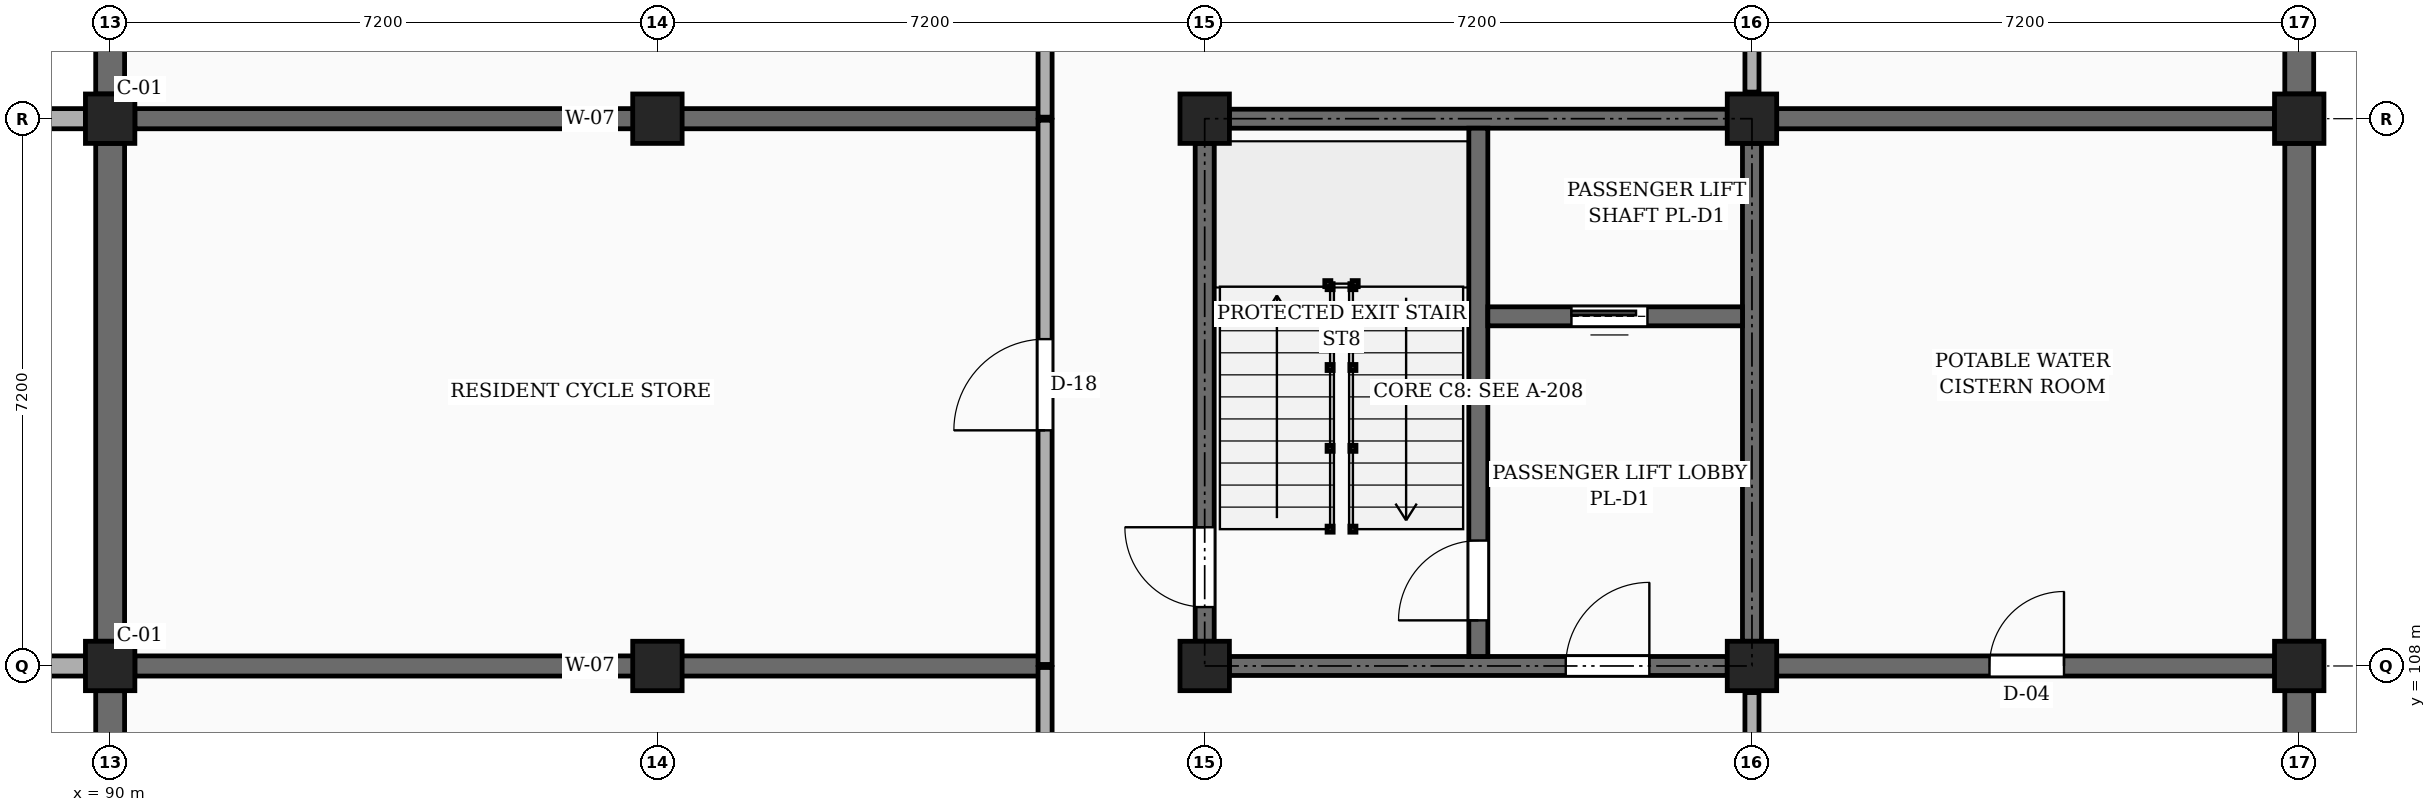
"""IFC4 building model, lengths in metres.
Left out: names, types, materials, properties, quantities, classifications, styles, units other than length and angle.
Written with IfcOpenShell. Run it as: python <this file> out.ifc"""

import sys

from ifc_helpers import new_model, si_unit, direction, frame, frame_2d, origin, origin_2d, place, context, subcontext, project, spatial, rectangle, extrude, element, fill, save


model = new_model("IFC4")
c1 = context("Model", 3, precision=1e-05, world=origin(), true_north=direction((0.0, 1.0)))
c2 = subcontext(c1, "Body", "Model", "MODEL_VIEW")
j1 = project(units=[si_unit("LENGTHUNIT", "METRE"), si_unit("PLANEANGLEUNIT", "RADIAN")], contexts=[c1])
p1 = place(None, origin())
s1 = spatial("IfcSite", under=j1, at=p1, CompositionType="ELEMENT")
p2 = place(p1, origin())
s2 = spatial("IfcBuilding", under=s1, at=p2, CompositionType="ELEMENT")
p3 = place(p2, frame((0.0, 0.0, -4.2)))
s3 = spatial("IfcBuildingStorey", under=s2, at=p3, CompositionType="ELEMENT", Elevation=-4.2)
for number, where, z_axis, x_axis in (
    (1, (87.81, 108.0, 0.0), (0.0, 0.0, 1.0), (1.0, 0.0, 0.0)),
    (2, (89.675, 115.2, 0.0), (0.0, 0.0, 1.0), (-1.0, 0.0, 0.0)),
):
    element("IfcWall", number, at=place(p3, frame(where, z_axis=z_axis, x_axis=x_axis)), inside=s3, PredefinedType="SOLIDWALL", context=c2, shape_type="SweptSolid", body=[
        extrude(rectangle(XDim=1.865, YDim=0.265, at=frame_2d((0.933, 0.0))), origin(), (0.0, 0.0, 1.0), 3.35),
    ])
for number, where, z_axis, x_axis in (
    (3, (90.0, 108.0, 0.0), (0.0, 0.0, 1.0), (1.0, 0.0, 0.0)),
    (4, (90.0, 115.2, 0.0), (0.0, 0.0, 1.0), (1.0, 0.0, 0.0)),
    (5, (97.2, 108.0, 0.0), (0.0, 0.0, 1.0), (1.0, 0.0, 0.0)),
    (6, (97.2, 115.2, 0.0), (0.0, 0.0, 1.0), (1.0, 0.0, 0.0)),
    (7, (104.4, 108.0, 0.0), (0.0, 0.0, 1.0), (1.0, 0.0, 0.0)),
    (8, (104.4, 115.2, 0.0), (0.0, 0.0, 1.0), (1.0, 0.0, 0.0)),
    (9, (111.6, 108.0, 0.0), (0.0, 0.0, 1.0), (1.0, 0.0, 0.0)),
    (10, (111.6, 115.2, 0.0), (0.0, 0.0, 1.0), (1.0, 0.0, 0.0)),
    (11, (118.8, 108.0, 0.0), (0.0, 0.0, 1.0), (1.0, 0.0, 0.0)),
    (12, (118.8, 115.2, 0.0), (0.0, 0.0, 1.0), (1.0, 0.0, 0.0)),
):
    element("IfcColumn", number, at=place(p3, frame(where, z_axis=z_axis, x_axis=x_axis)), inside=s3, PredefinedType="COLUMN", context=c2, shape_type="SweptSolid", body=[
        extrude(rectangle(XDim=0.65, YDim=0.65, at=origin_2d()), origin(), (0.0, 0.0, 1.0), 4.2),
    ])
for number, where, z_axis, x_axis in (
    (13, (118.8, 101.125, 0.0), (0.0, 0.0, 1.0), (0.0, 1.0, 0.0)),
    (14, (90.0, 107.675, 0.0), (0.0, 0.0, 1.0), (0.0, -1.0, 0.0)),
    (15, (118.8, 108.325, 0.0), (0.0, 0.0, 1.0), (0.0, 1.0, 0.0)),
    (16, (90.0, 114.875, 0.0), (0.0, 0.0, 1.0), (0.0, -1.0, 0.0)),
    (17, (118.8, 115.525, 0.0), (0.0, 0.0, 1.0), (0.0, 1.0, 0.0)),
    (18, (90.0, 122.075, 0.0), (0.0, 0.0, 1.0), (0.0, -1.0, 0.0)),
):
    element("IfcWall", number, at=place(p3, frame(where, z_axis=z_axis, x_axis=x_axis)), inside=s3, PredefinedType="USERDEFINED", context=c2, shape_type="SweptSolid", body=[
        extrude(rectangle(XDim=6.55, YDim=0.38, at=frame_2d((3.275, 0.0))), origin(), (0.0, 0.0, 1.0), 3.03),
    ])
p4 = place(p3, frame((90.325, 108.0, 0.0), z_axis=(0.0, 0.0, 1.0), x_axis=(1.0, 0.0, 0.0)))
e19 = element("IfcWall", 19, at=p4, inside=s3, PredefinedType="SOLIDWALL", context=c2, shape_type="SweptSolid", body=[
    extrude(rectangle(XDim=11.975, YDim=0.265, at=frame_2d((5.988, 0.0))), origin(), (0.0, 0.0, 1.0), 3.18),
])
p5 = place(p3, frame((111.925, 108.0, 0.0), z_axis=(0.0, 0.0, 1.0), x_axis=(1.0, 0.0, 0.0)))
e20 = element("IfcWall", 20, at=p5, inside=s3, PredefinedType="SOLIDWALL", context=c2, shape_type="SweptSolid", body=[
    extrude(rectangle(XDim=6.55, YDim=0.265, at=frame_2d((3.275, 0.0))), origin(), (0.0, 0.0, 1.0), 3.18),
])
p6 = place(p5, frame((2.8, 0.0, 0.0)))
e21 = element("IfcOpeningElement", 21, at=p6, cuts=e20, PredefinedType="OPENING", context=c2, shape_type="SweptSolid", body=[
    extrude(rectangle(XDim=0.98, YDim=2.12, at=frame_2d((0.49, 1.06))), frame((0.0, 0.143, 0.0), z_axis=(0.0, -1.0, 0.0), x_axis=(1.0, 0.0, 0.0)), (0.0, 0.0, 1.0), 0.285),
])
p7 = place(p3, frame((90.325, 115.2, 0.0), z_axis=(0.0, 0.0, 1.0), x_axis=(1.0, 0.0, 0.0)))
e22 = element("IfcWall", 22, at=p7, inside=s3, PredefinedType="SOLIDWALL", context=c2, shape_type="SweptSolid", body=[
    extrude(rectangle(XDim=11.975, YDim=0.265, at=frame_2d((5.988, 0.0))), origin(), (0.0, 0.0, 1.0), 3.18),
])
p8 = place(p3, frame((111.925, 115.2, 0.0), z_axis=(0.0, 0.0, 1.0), x_axis=(1.0, 0.0, 0.0)))
e23 = element("IfcWall", 23, at=p8, inside=s3, PredefinedType="SOLIDWALL", context=c2, shape_type="SweptSolid", body=[
    extrude(rectangle(XDim=6.55, YDim=0.265, at=frame_2d((3.275, 0.0))), origin(), (0.0, 0.0, 1.0), 3.18),
])
p9 = place(p3, frame((104.4, 108.325, 0.0), z_axis=(0.0, 0.0, 1.0), x_axis=(0.0, 1.0, 0.0)))
e24 = element("IfcWall", 24, at=p9, inside=s3, PredefinedType="SHEAR", context=c2, shape_type="SweptSolid", body=[
    extrude(rectangle(XDim=6.55, YDim=0.25, at=frame_2d((3.275, 0.0))), origin(), (0.0, 0.0, 1.0), 3.88),
])
p10 = place(p9, frame((0.45, 0.0, 0.0)))
e25 = element("IfcOpeningElement", 25, at=p10, cuts=e24, PredefinedType="OPENING", context=c2, shape_type="SweptSolid", body=[
    extrude(rectangle(XDim=1.05, YDim=2.15, at=frame_2d((0.525, 1.075))), frame((0.0, 0.135, 0.0), z_axis=(0.0, -1.0, 0.0), x_axis=(1.0, 0.0, 0.0)), (0.0, 0.0, 1.0), 0.27),
])
p11 = place(p3, frame((104.725, 115.2, 0.0), z_axis=(0.0, 0.0, 1.0), x_axis=(1.0, 0.0, 0.0)))
e26 = element("IfcWall", 26, at=p11, inside=s3, PredefinedType="SHEAR", context=c2, shape_type="SweptSolid", body=[
    extrude(rectangle(XDim=6.55, YDim=0.25, at=frame_2d((3.275, 0.0))), origin(), (0.0, 0.0, 1.0), 3.88),
])
p12 = place(p3, frame((111.6, 108.325, 0.0), z_axis=(0.0, 0.0, 1.0), x_axis=(0.0, 1.0, 0.0)))
e27 = element("IfcWall", 27, at=p12, inside=s3, PredefinedType="SHEAR", context=c2, shape_type="SweptSolid", body=[
    extrude(rectangle(XDim=6.55, YDim=0.25, at=frame_2d((3.275, 0.0))), origin(), (0.0, 0.0, 1.0), 3.88),
])
p13 = place(p3, frame((104.725, 108.0, 0.0), z_axis=(0.0, 0.0, 1.0), x_axis=(1.0, 0.0, 0.0)))
e28 = element("IfcWall", 28, at=p13, inside=s3, PredefinedType="SHEAR", context=c2, shape_type="SweptSolid", body=[
    extrude(rectangle(XDim=6.55, YDim=0.25, at=frame_2d((3.275, 0.0))), origin(), (0.0, 0.0, 1.0), 3.88),
])
p14 = place(p13, frame((4.425, 0.0, 0.0)))
e29 = element("IfcOpeningElement", 29, at=p14, cuts=e28, PredefinedType="OPENING", context=c2, shape_type="SweptSolid", body=[
    extrude(rectangle(XDim=1.1, YDim=2.15, at=frame_2d((0.55, 1.075))), frame((0.0, 0.135, 0.0), z_axis=(0.0, -1.0, 0.0), x_axis=(1.0, 0.0, 0.0)), (0.0, 0.0, 1.0), 0.27),
])
p15 = place(p3, frame((108.0, 108.125, 0.0), z_axis=(0.0, 0.0, 1.0), x_axis=(0.0, 1.0, 0.0)))
e30 = element("IfcWall", 30, at=p15, inside=s3, PredefinedType="SHEAR", context=c2, shape_type="SweptSolid", body=[
    extrude(rectangle(XDim=6.95, YDim=0.25, at=frame_2d((3.475, 0.0))), origin(), (0.0, 0.0, 1.0), 3.88),
])
p16 = place(p15, frame((0.475, 0.0, 0.0)))
e31 = element("IfcOpeningElement", 31, at=p16, cuts=e30, PredefinedType="OPENING", context=c2, shape_type="SweptSolid", body=[
    extrude(rectangle(XDim=1.05, YDim=2.15, at=frame_2d((0.525, 1.075))), frame((0.0, 0.135, 0.0), z_axis=(0.0, -1.0, 0.0), x_axis=(1.0, 0.0, 0.0)), (0.0, 0.0, 1.0), 0.27),
])
p17 = place(p3, frame((108.125, 112.6, 0.0), z_axis=(0.0, 0.0, 1.0), x_axis=(1.0, 0.0, 0.0)))
e32 = element("IfcWall", 32, at=p17, inside=s3, PredefinedType="SHEAR", context=c2, shape_type="SweptSolid", body=[
    extrude(rectangle(XDim=3.35, YDim=0.25, at=frame_2d((1.675, 0.0))), origin(), (0.0, 0.0, 1.0), 3.88),
])
p18 = place(p17, frame((1.1, 0.0, 0.0)))
e33 = element("IfcOpeningElement", 33, at=p18, cuts=e32, PredefinedType="OPENING", context=c2, shape_type="SweptSolid", body=[
    extrude(rectangle(XDim=1.0, YDim=2.2, at=frame_2d((0.5, 1.1))), frame((0.0, 0.135, 0.0), z_axis=(0.0, -1.0, 0.0), x_axis=(1.0, 0.0, 0.0)), (0.0, 0.0, 1.0), 0.27),
])
p19 = place(p3, frame((102.3, 100.82, 0.0), z_axis=(0.0, 0.0, 1.0), x_axis=(0.0, 1.0, 0.0)))
e34 = element("IfcWall", 34, at=p19, inside=s3, PredefinedType="PARTITIONING", context=c2, shape_type="SweptSolid", body=[
    extrude(rectangle(XDim=7.16, YDim=0.185, at=frame_2d((3.58, 0.0))), origin(), (0.0, 0.0, 1.0), 3.315),
])
p20 = place(p19, frame((3.08, 0.0, 0.0)))
e35 = element("IfcOpeningElement", 35, at=p20, cuts=e34, PredefinedType="OPENING", context=c2, shape_type="SweptSolid", body=[
    extrude(rectangle(XDim=1.2, YDim=2.2, at=frame_2d((0.6, 1.1))), frame((0.0, 0.103, 0.0), z_axis=(0.0, -1.0, 0.0), x_axis=(1.0, 0.0, 0.0)), (0.0, 0.0, 1.0), 0.205),
])
p21 = place(p3, frame((102.3, 108.02, 0.0), z_axis=(0.0, 0.0, 1.0), x_axis=(0.0, 1.0, 0.0)))
e36 = element("IfcWall", 36, at=p21, inside=s3, PredefinedType="PARTITIONING", context=c2, shape_type="SweptSolid", body=[
    extrude(rectangle(XDim=7.16, YDim=0.185, at=frame_2d((3.58, 0.0))), origin(), (0.0, 0.0, 1.0), 3.315),
])
p22 = place(p21, frame((3.08, 0.0, 0.0)))
e37 = element("IfcOpeningElement", 37, at=p22, cuts=e36, PredefinedType="OPENING", context=c2, shape_type="SweptSolid", body=[
    extrude(rectangle(XDim=1.2, YDim=2.2, at=frame_2d((0.6, 1.1))), frame((0.0, 0.103, 0.0), z_axis=(0.0, -1.0, 0.0), x_axis=(1.0, 0.0, 0.0)), (0.0, 0.0, 1.0), 0.205),
])
p23 = place(p3, frame((102.3, 115.22, 0.0), z_axis=(0.0, 0.0, 1.0), x_axis=(0.0, 1.0, 0.0)))
e38 = element("IfcWall", 38, at=p23, inside=s3, PredefinedType="PARTITIONING", context=c2, shape_type="SweptSolid", body=[
    extrude(rectangle(XDim=7.16, YDim=0.185, at=frame_2d((3.58, 0.0))), origin(), (0.0, 0.0, 1.0), 3.315),
])
p24 = place(p23, frame((3.08, 0.0, 0.0)))
e39 = element("IfcOpeningElement", 39, at=p24, cuts=e38, PredefinedType="OPENING", context=c2, shape_type="SweptSolid", body=[
    extrude(rectangle(XDim=1.2, YDim=2.2, at=frame_2d((0.6, 1.1))), frame((0.0, 0.103, 0.0), z_axis=(0.0, -1.0, 0.0), x_axis=(1.0, 0.0, 0.0)), (0.0, 0.0, 1.0), 0.205),
])
p25 = place(p3, frame((111.6, 101.15, 0.0), z_axis=(0.0, 0.0, 1.0), x_axis=(0.0, 1.0, 0.0)))
e40 = element("IfcWall", 40, at=p25, inside=s3, PredefinedType="PARTITIONING", context=c2, shape_type="SweptSolid", body=[
    extrude(rectangle(XDim=6.5, YDim=0.185, at=frame_2d((3.25, 0.0))), origin(), (0.0, 0.0, 1.0), 3.08),
])
p26 = place(p25, frame((2.75, 0.0, 0.0)))
e41 = element("IfcOpeningElement", 41, at=p26, cuts=e40, PredefinedType="OPENING", context=c2, shape_type="SweptSolid", body=[
    extrude(rectangle(XDim=1.2, YDim=2.2, at=frame_2d((0.6, 1.1))), frame((0.0, 0.103, 0.0), z_axis=(0.0, -1.0, 0.0), x_axis=(1.0, 0.0, 0.0)), (0.0, 0.0, 1.0), 0.205),
])
p27 = place(p3, frame((111.6, 115.55, 0.0), z_axis=(0.0, 0.0, 1.0), x_axis=(0.0, 1.0, 0.0)))
e42 = element("IfcWall", 42, at=p27, inside=s3, PredefinedType="PARTITIONING", context=c2, shape_type="SweptSolid", body=[
    extrude(rectangle(XDim=6.5, YDim=0.185, at=frame_2d((3.25, 0.0))), origin(), (0.0, 0.0, 1.0), 3.08),
])
p28 = place(p27, frame((2.75, 0.0, 0.0)))
e43 = element("IfcOpeningElement", 43, at=p28, cuts=e42, PredefinedType="OPENING", context=c2, shape_type="SweptSolid", body=[
    extrude(rectangle(XDim=1.2, YDim=2.2, at=frame_2d((0.6, 1.1))), frame((0.0, 0.103, 0.0), z_axis=(0.0, -1.0, 0.0), x_axis=(1.0, 0.0, 0.0)), (0.0, 0.0, 1.0), 0.205),
])
p29 = place(p10, origin())
e44 = element("IfcDoor", 44, at=p29, inside=s3, OperationType="SINGLE_SWING_RIGHT", PredefinedType="DOOR", context=c2, shape_type="SweptSolid", body=[
    extrude(rectangle(XDim=1.05, YDim=2.15, at=frame_2d((0.525, 1.075))), frame((0.0, 0.025, 0.0), z_axis=(0.0, -1.0, 0.0), x_axis=(1.0, 0.0, 0.0)), (0.0, 0.0, 1.0), 0.05),
])
fill(e25, e44)
p30 = place(p14, frame((1.1, 0.0, 0.0), z_axis=(0.0, 0.0, 1.0), x_axis=(-1.0, 0.0, 0.0)))
e45 = element("IfcDoor", 45, at=p30, inside=s3, OperationType="SINGLE_SWING_RIGHT", PredefinedType="DOOR", context=c2, shape_type="SweptSolid", body=[
    extrude(rectangle(XDim=1.1, YDim=2.15, at=frame_2d((0.55, 1.075))), frame((0.0, 0.025, 0.0), z_axis=(0.0, -1.0, 0.0), x_axis=(1.0, 0.0, 0.0)), (0.0, 0.0, 1.0), 0.05),
])
fill(e29, e45)
p31 = place(p16, origin())
e46 = element("IfcDoor", 46, at=p31, inside=s3, OperationType="SINGLE_SWING_LEFT", PredefinedType="DOOR", context=c2, shape_type="SweptSolid", body=[
    extrude(rectangle(XDim=1.05, YDim=2.15, at=frame_2d((0.525, 1.075))), frame((0.0, 0.025, 0.0), z_axis=(0.0, -1.0, 0.0), x_axis=(1.0, 0.0, 0.0)), (0.0, 0.0, 1.0), 0.05),
])
fill(e31, e46)
p32 = place(p18, origin())
e47 = element("IfcDoor", 47, at=p32, inside=s3, OperationType="SLIDING_TO_LEFT", PredefinedType="DOOR", context=c2, shape_type="SweptSolid", body=[
    extrude(rectangle(XDim=1.0, YDim=2.2, at=frame_2d((0.5, 1.1))), frame((0.0, 0.025, 0.0), z_axis=(0.0, -1.0, 0.0), x_axis=(1.0, 0.0, 0.0)), (0.0, 0.0, 1.0), 0.05),
])
fill(e33, e47)
p33 = place(p22, origin())
e48 = element("IfcDoor", 48, at=p33, inside=s3, OperationType="SINGLE_SWING_LEFT", PredefinedType="DOOR", context=c2, shape_type="SweptSolid", body=[
    extrude(rectangle(XDim=1.2, YDim=2.2, at=frame_2d((0.6, 1.1))), frame((0.0, 0.025, 0.0), z_axis=(0.0, -1.0, 0.0), x_axis=(1.0, 0.0, 0.0)), (0.0, 0.0, 1.0), 0.05),
])
fill(e37, e48)
p34 = place(p6, origin())
e49 = element("IfcDoor", 49, at=p34, inside=s3, OperationType="SINGLE_SWING_RIGHT", PredefinedType="DOOR", context=c2, shape_type="SweptSolid", body=[
    extrude(rectangle(XDim=0.98, YDim=2.12, at=frame_2d((0.49, 1.06))), frame((0.0, 0.025, 0.0), z_axis=(0.0, -1.0, 0.0), x_axis=(1.0, 0.0, 0.0)), (0.0, 0.0, 1.0), 0.05),
])
fill(e21, e49)
save(model, sys.argv[1])
